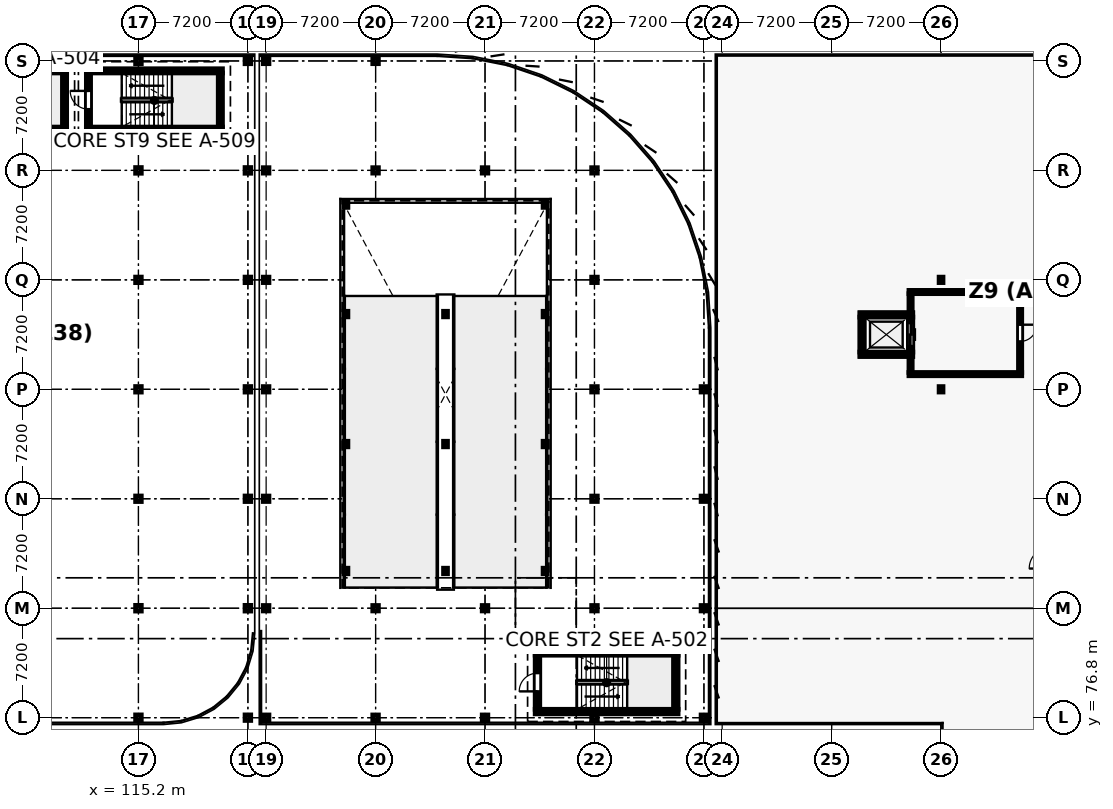
"""IFC4 building model, lengths in metres.
Left out: names, types, materials, properties, quantities, classifications, styles, units other than length and angle.
Written with IfcOpenShell. Run it as: python <this file> out.ifc"""

import sys

from ifc_helpers import new_model, si_unit, direction, frame, frame_2d, origin, origin_2d, place, context, subcontext, project, spatial, rectangle, i_section, extrude, element, fill, save


model = new_model("IFC4")
c1 = context("Model", 3, precision=1e-05, world=origin(), true_north=direction((0.0, 1.0)))
c2 = subcontext(c1, "Body", "Model", "MODEL_VIEW")
j1 = project(units=[si_unit("LENGTHUNIT", "METRE"), si_unit("PLANEANGLEUNIT", "RADIAN")], contexts=[c1])
p1 = place(None, origin())
s1 = spatial("IfcSite", under=j1, at=p1, CompositionType="ELEMENT")
p2 = place(p1, origin())
s2 = spatial("IfcBuilding", under=s1, at=p2, CompositionType="ELEMENT")
p3 = place(p2, frame((0.0, 0.0, 13.2)))
s3 = spatial("IfcBuildingStorey", under=s2, at=p3, CompositionType="ELEMENT", Elevation=13.2)
for number, where, z_axis, x_axis in (
    (1, (123.6, 76.8, 0.0), (0.0, 0.0, 1.0), (1.0, 0.0, 0.0)),
    (2, (123.6, 84.0, 0.0), (0.0, 0.0, 1.0), (1.0, 0.0, 0.0)),
    (3, (123.6, 91.2, 0.0), (0.0, 0.0, 1.0), (1.0, 0.0, 0.0)),
    (4, (123.6, 98.4, 0.0), (0.0, 0.0, 1.0), (1.0, 0.0, 0.0)),
    (5, (123.6, 105.6, 0.0), (0.0, 0.0, 1.0), (1.0, 0.0, 0.0)),
    (6, (123.6, 112.8, 0.0), (0.0, 0.0, 1.0), (1.0, 0.0, 0.0)),
    (7, (123.6, 120.0, 0.0), (0.0, 0.0, 1.0), (1.0, 0.0, 0.0)),
    (8, (130.8, 76.8, 0.0), (0.0, 0.0, 1.0), (1.0, 0.0, 0.0)),
    (9, (130.8, 84.0, 0.0), (0.0, 0.0, 1.0), (1.0, 0.0, 0.0)),
    (10, (130.8, 112.8, 0.0), (0.0, 0.0, 1.0), (1.0, 0.0, 0.0)),
    (11, (130.8, 120.0, 0.0), (0.0, 0.0, 1.0), (1.0, 0.0, 0.0)),
    (12, (138.0, 76.8, 0.0), (0.0, 0.0, 1.0), (1.0, 0.0, 0.0)),
    (13, (138.0, 84.0, 0.0), (0.0, 0.0, 1.0), (1.0, 0.0, 0.0)),
    (14, (138.0, 112.8, 0.0), (0.0, 0.0, 1.0), (1.0, 0.0, 0.0)),
    (15, (145.2, 76.8, 0.0), (0.0, 0.0, 1.0), (1.0, 0.0, 0.0)),
    (16, (145.2, 84.0, 0.0), (0.0, 0.0, 1.0), (1.0, 0.0, 0.0)),
    (17, (145.2, 91.2, 0.0), (0.0, 0.0, 1.0), (1.0, 0.0, 0.0)),
    (18, (145.2, 98.4, 0.0), (0.0, 0.0, 1.0), (1.0, 0.0, 0.0)),
    (19, (145.2, 105.6, 0.0), (0.0, 0.0, 1.0), (1.0, 0.0, 0.0)),
    (20, (145.2, 112.8, 0.0), (0.0, 0.0, 1.0), (1.0, 0.0, 0.0)),
    (21, (152.4, 76.8, 0.0), (0.0, 0.0, 1.0), (1.0, 0.0, 0.0)),
    (22, (152.4, 84.0, 0.0), (0.0, 0.0, 1.0), (1.0, 0.0, 0.0)),
    (23, (152.4, 91.2, 0.0), (0.0, 0.0, 1.0), (1.0, 0.0, 0.0)),
    (24, (152.4, 98.4, 0.0), (0.0, 0.0, 1.0), (1.0, 0.0, 0.0)),
):
    element("IfcColumn", number, at=place(p3, frame(where, z_axis=z_axis, x_axis=x_axis)), inside=s3, PredefinedType="COLUMN", context=c2, shape_type="SweptSolid", body=[
        extrude(i_section(OverallWidth=0.368, OverallDepth=0.356, WebThickness=0.011, FlangeThickness=0.018, FilletRadius=0.015, at=origin_2d()), origin(), (0.0, 0.0, 1.0), 3.9),
    ])
for number, where, z_axis, x_axis in (
    (25, (128.85, 86.45, 0.0), (0.0, 0.0, 1.0), (1.0, 0.0, 0.0)),
    (26, (135.4, 86.45, 0.0), (0.0, 0.0, 1.0), (1.0, 0.0, 0.0)),
    (27, (141.95, 86.45, 0.0), (0.0, 0.0, 1.0), (1.0, 0.0, 0.0)),
    (28, (128.85, 94.8, 0.0), (0.0, 0.0, 1.0), (1.0, 0.0, 0.0)),
    (29, (135.4, 94.8, 0.0), (0.0, 0.0, 1.0), (1.0, 0.0, 0.0)),
    (30, (141.95, 94.8, 0.0), (0.0, 0.0, 1.0), (1.0, 0.0, 0.0)),
    (31, (128.85, 103.35, 0.0), (0.0, 0.0, 1.0), (1.0, 0.0, 0.0)),
    (32, (135.4, 103.35, 0.0), (0.0, 0.0, 1.0), (1.0, 0.0, 0.0)),
    (33, (141.95, 103.35, 0.0), (0.0, 0.0, 1.0), (1.0, 0.0, 0.0)),
    (34, (128.85, 110.55, 0.0), (0.0, 0.0, 1.0), (1.0, 0.0, 0.0)),
    (35, (141.95, 110.55, 0.0), (0.0, 0.0, 1.0), (1.0, 0.0, 0.0)),
):
    element("IfcColumn", number, at=place(p3, frame(where, z_axis=z_axis, x_axis=x_axis)), inside=s3, PredefinedType="COLUMN", context=c2, shape_type="SweptSolid", body=[
        extrude(i_section(OverallWidth=0.257, OverallDepth=0.363, WebThickness=0.013, FlangeThickness=0.022, FilletRadius=0.015, at=origin_2d()), origin(), (0.0, 0.0, 1.0), 3.9),
    ])
p4 = place(p3, frame((115.2, 76.8, 0.0), z_axis=(0.0, 0.0, 1.0), x_axis=(1.0, 0.0, 0.0)))
e36 = element("IfcColumn", 36, at=p4, inside=s3, PredefinedType="COLUMN", context=c2, shape_type="SweptSolid", body=[
    extrude(i_section(OverallWidth=0.371, OverallDepth=0.363, WebThickness=0.013, FlangeThickness=0.022, FilletRadius=0.015, at=origin_2d()), origin(), (0.0, 0.0, 1.0), 3.9),
])
p5 = place(p3, frame((115.2, 84.0, 0.0), z_axis=(0.0, 0.0, 1.0), x_axis=(1.0, 0.0, 0.0)))
e37 = element("IfcColumn", 37, at=p5, inside=s3, PredefinedType="COLUMN", context=c2, shape_type="SweptSolid", body=[
    extrude(i_section(OverallWidth=0.373, OverallDepth=0.373, WebThickness=0.016, FlangeThickness=0.026, FilletRadius=0.015, at=origin_2d()), origin(), (0.0, 0.0, 1.0), 3.9),
])
for number, where, z_axis, x_axis in (
    (38, (115.2, 91.2, 0.0), (0.0, 0.0, 1.0), (1.0, 0.0, 0.0)),
    (39, (115.2, 98.4, 0.0), (0.0, 0.0, 1.0), (1.0, 0.0, 0.0)),
    (40, (115.2, 105.6, 0.0), (0.0, 0.0, 1.0), (1.0, 0.0, 0.0)),
):
    element("IfcColumn", number, at=place(p3, frame(where, z_axis=z_axis, x_axis=x_axis)), inside=s3, PredefinedType="COLUMN", context=c2, shape_type="SweptSolid", body=[
        extrude(i_section(OverallWidth=0.371, OverallDepth=0.363, WebThickness=0.013, FlangeThickness=0.022, FilletRadius=0.015, at=origin_2d()), origin(), (0.0, 0.0, 1.0), 3.9),
    ])
p6 = place(p3, frame((115.2, 112.8, 0.0), z_axis=(0.0, 0.0, 1.0), x_axis=(1.0, 0.0, 0.0)))
e41 = element("IfcColumn", 41, at=p6, inside=s3, PredefinedType="COLUMN", context=c2, shape_type="SweptSolid", body=[
    extrude(i_section(OverallWidth=0.373, OverallDepth=0.373, WebThickness=0.016, FlangeThickness=0.026, FilletRadius=0.015, at=origin_2d()), origin(), (0.0, 0.0, 1.0), 3.9),
])
for number, where, z_axis, x_axis in (
    (42, (115.2, 120.0, 0.0), (0.0, 0.0, 1.0), (1.0, 0.0, 0.0)),
    (43, (122.4, 76.8, 0.0), (0.0, 0.0, 1.0), (1.0, 0.0, 0.0)),
):
    element("IfcColumn", number, at=place(p3, frame(where, z_axis=z_axis, x_axis=x_axis)), inside=s3, PredefinedType="COLUMN", context=c2, shape_type="SweptSolid", body=[
        extrude(i_section(OverallWidth=0.371, OverallDepth=0.363, WebThickness=0.013, FlangeThickness=0.022, FilletRadius=0.015, at=origin_2d()), origin(), (0.0, 0.0, 1.0), 3.9),
    ])
p7 = place(p3, frame((122.4, 84.0, 0.0), z_axis=(0.0, 0.0, 1.0), x_axis=(1.0, 0.0, 0.0)))
e44 = element("IfcColumn", 44, at=p7, inside=s3, PredefinedType="COLUMN", context=c2, shape_type="SweptSolid", body=[
    extrude(i_section(OverallWidth=0.373, OverallDepth=0.373, WebThickness=0.016, FlangeThickness=0.026, FilletRadius=0.015, at=origin_2d()), origin(), (0.0, 0.0, 1.0), 3.9),
])
for number, where, z_axis, x_axis in (
    (45, (122.4, 91.2, 0.0), (0.0, 0.0, 1.0), (1.0, 0.0, 0.0)),
    (46, (122.4, 98.4, 0.0), (0.0, 0.0, 1.0), (1.0, 0.0, 0.0)),
    (47, (122.4, 105.6, 0.0), (0.0, 0.0, 1.0), (1.0, 0.0, 0.0)),
):
    element("IfcColumn", number, at=place(p3, frame(where, z_axis=z_axis, x_axis=x_axis)), inside=s3, PredefinedType="COLUMN", context=c2, shape_type="SweptSolid", body=[
        extrude(i_section(OverallWidth=0.371, OverallDepth=0.363, WebThickness=0.013, FlangeThickness=0.022, FilletRadius=0.015, at=origin_2d()), origin(), (0.0, 0.0, 1.0), 3.9),
    ])
p8 = place(p3, frame((122.4, 112.8, 0.0), z_axis=(0.0, 0.0, 1.0), x_axis=(1.0, 0.0, 0.0)))
e48 = element("IfcColumn", 48, at=p8, inside=s3, PredefinedType="COLUMN", context=c2, shape_type="SweptSolid", body=[
    extrude(i_section(OverallWidth=0.373, OverallDepth=0.373, WebThickness=0.016, FlangeThickness=0.026, FilletRadius=0.015, at=origin_2d()), origin(), (0.0, 0.0, 1.0), 3.9),
])
p9 = place(p3, frame((122.4, 120.0, 0.0), z_axis=(0.0, 0.0, 1.0), x_axis=(1.0, 0.0, 0.0)))
e49 = element("IfcColumn", 49, at=p9, inside=s3, PredefinedType="COLUMN", context=c2, shape_type="SweptSolid", body=[
    extrude(i_section(OverallWidth=0.371, OverallDepth=0.363, WebThickness=0.013, FlangeThickness=0.022, FilletRadius=0.015, at=origin_2d()), origin(), (0.0, 0.0, 1.0), 3.9),
])
for number, where, z_axis, x_axis in (
    (50, (168.0, 98.4, 0.0), (0.0, 0.0, 1.0), (1.0, 0.0, 0.0)),
    (51, (168.0, 105.6, 0.0), (0.0, 0.0, 1.0), (1.0, 0.0, 0.0)),
):
    element("IfcColumn", number, at=place(p3, frame(where, z_axis=z_axis, x_axis=x_axis)), inside=s3, PredefinedType="COLUMN", context=c2, shape_type="SweptSolid", body=[
        extrude(i_section(OverallWidth=0.254, OverallDepth=0.356, WebThickness=0.01, FlangeThickness=0.018, FilletRadius=0.015, at=origin_2d()), origin(), (0.0, 0.0, 1.0), 3.66),
    ])
for number, where, z_axis, x_axis in (
    (52, (150.7, 77.2, 0.0), (0.0, 0.0, 1.0), (-1.0, 0.0, 0.0)),
    (53, (141.3, 81.06, 0.0), (0.0, 0.0, 1.0), (1.0, 0.0, 0.0)),
):
    element("IfcWall", number, at=place(p3, frame(where, z_axis=z_axis, x_axis=x_axis)), inside=s3, PredefinedType="SOLIDWALL", context=c2, shape_type="SweptSolid", body=[
        extrude(rectangle(XDim=9.4, YDim=0.3, at=frame_2d((4.7, 0.0))), origin(), (0.0, 0.0, 1.0), 3.65),
    ])
p10 = place(p3, frame((141.45, 77.35, 0.0), z_axis=(0.0, 0.0, 1.0), x_axis=(0.0, 1.0, 0.0)))
e54 = element("IfcWall", 54, at=p10, inside=s3, PredefinedType="SOLIDWALL", context=c2, shape_type="SweptSolid", body=[
    extrude(rectangle(XDim=3.56, YDim=0.3, at=frame_2d((1.78, 0.0))), origin(), (0.0, 0.0, 1.0), 3.65),
])
p11 = place(p10, frame((1.18, 0.0, 0.0)))
e55 = element("IfcOpeningElement", 55, at=p11, cuts=e54, PredefinedType="OPENING", context=c2, shape_type="SweptSolid", body=[
    extrude(rectangle(XDim=1.2, YDim=2.2, at=frame_2d((0.6, 1.1))), frame((0.0, 0.16, 0.0), z_axis=(0.0, -1.0, 0.0), x_axis=(1.0, 0.0, 0.0)), (0.0, 0.0, 1.0), 0.32),
])
p12 = place(p3, frame((150.55, 80.91, 0.0), z_axis=(0.0, 0.0, 1.0), x_axis=(0.0, -1.0, 0.0)))
e56 = element("IfcWall", 56, at=p12, inside=s3, PredefinedType="SOLIDWALL", context=c2, shape_type="SweptSolid", body=[
    extrude(rectangle(XDim=3.56, YDim=0.3, at=frame_2d((1.78, 0.0))), origin(), (0.0, 0.0, 1.0), 3.65),
])
for number, where, z_axis, x_axis in (
    (57, (110.475, 115.512, 0.0), (0.0, 0.0, 1.0), (-1.0, 0.0, 0.0)),
    (58, (101.575, 119.348, 0.0), (0.0, 0.0, 1.0), (1.0, 0.0, 0.0)),
):
    element("IfcWall", number, at=place(p3, frame(where, z_axis=z_axis, x_axis=x_axis)), inside=s3, PredefinedType="SOLIDWALL", context=c2, shape_type="SweptSolid", body=[
        extrude(rectangle(XDim=8.9, YDim=0.275, at=frame_2d((4.45, 0.0))), origin(), (0.0, 0.0, 1.0), 3.66),
    ])
p13 = place(p3, frame((110.338, 119.21, 0.0), z_axis=(0.0, 0.0, 1.0), x_axis=(0.0, -1.0, 0.0)))
e59 = element("IfcWall", 59, at=p13, inside=s3, PredefinedType="SOLIDWALL", context=c2, shape_type="SweptSolid", body=[
    extrude(rectangle(XDim=3.56, YDim=0.275, at=frame_2d((1.78, 0.0))), origin(), (0.0, 0.0, 1.0), 3.66),
])
for number, where, z_axis, x_axis in (
    (60, (120.725, 115.512, 0.0), (0.0, 0.0, 1.0), (-1.0, 0.0, 0.0)),
    (61, (111.775, 119.348, 0.0), (0.0, 0.0, 1.0), (1.0, 0.0, 0.0)),
):
    element("IfcWall", number, at=place(p3, frame(where, z_axis=z_axis, x_axis=x_axis)), inside=s3, PredefinedType="SOLIDWALL", context=c2, shape_type="SweptSolid", body=[
        extrude(rectangle(XDim=8.95, YDim=0.275, at=frame_2d((4.475, 0.0))), origin(), (0.0, 0.0, 1.0), 3.66),
    ])
p14 = place(p3, frame((111.912, 115.65, 0.0), z_axis=(0.0, 0.0, 1.0), x_axis=(0.0, 1.0, 0.0)))
e62 = element("IfcWall", 62, at=p14, inside=s3, PredefinedType="SOLIDWALL", context=c2, shape_type="SweptSolid", body=[
    extrude(rectangle(XDim=3.56, YDim=0.275, at=frame_2d((1.78, 0.0))), origin(), (0.0, 0.0, 1.0), 3.66),
])
p15 = place(p14, frame((1.18, 0.0, 0.0)))
e63 = element("IfcOpeningElement", 63, at=p15, cuts=e62, PredefinedType="OPENING", context=c2, shape_type="SweptSolid", body=[
    extrude(rectangle(XDim=1.2, YDim=2.2, at=frame_2d((0.6, 1.1))), frame((0.0, 0.147, 0.0), z_axis=(0.0, -1.0, 0.0), x_axis=(1.0, 0.0, 0.0)), (0.0, 0.0, 1.0), 0.295),
])
p16 = place(p3, frame((120.588, 119.21, 0.0), z_axis=(0.0, 0.0, 1.0), x_axis=(0.0, -1.0, 0.0)))
e64 = element("IfcWall", 64, at=p16, inside=s3, PredefinedType="SOLIDWALL", context=c2, shape_type="SweptSolid", body=[
    extrude(rectangle(XDim=3.56, YDim=0.275, at=frame_2d((1.78, 0.0))), origin(), (0.0, 0.0, 1.0), 3.66),
])
for number, where, z_axis, x_axis in (
    (65, (166.14, 100.705, 0.0), (0.0, 0.0, 1.0), (-1.0, 0.0, 0.0)),
    (66, (162.66, 103.295, 0.0), (0.0, 0.0, 1.0), (1.0, 0.0, 0.0)),
):
    element("IfcWall", number, at=place(p3, frame(where, z_axis=z_axis, x_axis=x_axis)), inside=s3, PredefinedType="SHEAR", context=c2, shape_type="SweptSolid", body=[
        extrude(rectangle(XDim=3.48, YDim=0.29, at=frame_2d((1.74, 0.0))), origin(), (0.0, 0.0, 1.0), 3.4),
    ])
p17 = place(p3, frame((162.805, 100.85, 0.0), z_axis=(0.0, 0.0, 1.0), x_axis=(0.0, 1.0, 0.0)))
e67 = element("IfcWall", 67, at=p17, inside=s3, PredefinedType="SHEAR", context=c2, shape_type="SweptSolid", body=[
    extrude(rectangle(XDim=2.3, YDim=0.29, at=frame_2d((1.15, 0.0))), origin(), (0.0, 0.0, 1.0), 3.4),
])
p18 = place(p3, frame((165.995, 103.15, 0.0), z_axis=(0.0, 0.0, 1.0), x_axis=(0.0, -1.0, 0.0)))
e68 = element("IfcWall", 68, at=p18, inside=s3, PredefinedType="SHEAR", context=c2, shape_type="SweptSolid", body=[
    extrude(rectangle(XDim=2.3, YDim=0.29, at=frame_2d((1.15, 0.0))), origin(), (0.0, 0.0, 1.0), 3.4),
])
p19 = place(p18, frame((0.4, 0.0, 0.0)))
e69 = element("IfcOpeningElement", 69, at=p19, cuts=e68, PredefinedType="OPENING", context=c2, shape_type="SweptSolid", body=[
    extrude(rectangle(XDim=1.5, YDim=2.3, at=frame_2d((0.75, 1.15))), frame((0.0, 0.155, 0.0), z_axis=(0.0, -1.0, 0.0), x_axis=(1.0, 0.0, 0.0)), (0.0, 0.0, 1.0), 0.31),
])
for number, where, z_axis, x_axis in (
    (70, (173.306, 99.4, 0.0), (0.0, 0.0, 1.0), (-1.0, 0.0, 0.0)),
    (71, (165.889, 104.8, 0.0), (0.0, 0.0, 1.0), (1.0, 0.0, 0.0)),
):
    element("IfcWall", number, at=place(p3, frame(where, z_axis=z_axis, x_axis=x_axis)), inside=s3, PredefinedType="PARTITIONING", context=c2, shape_type="SweptSolid", body=[
        extrude(rectangle(XDim=7.417, YDim=0.212, at=frame_2d((3.708, 0.0))), origin(), (0.0, 0.0, 1.0), 3.13),
    ])
p20 = place(p3, frame((165.995, 99.508, 0.0), z_axis=(0.0, 0.0, 1.0), x_axis=(0.0, 1.0, 0.0)))
e72 = element("IfcWall", 72, at=p20, inside=s3, PredefinedType="PARTITIONING", context=c2, shape_type="SweptSolid", body=[
    extrude(rectangle(XDim=1.05, YDim=0.212, at=frame_2d((0.525, 0.0))), origin(), (0.0, 0.0, 1.0), 3.13),
])
p21 = place(p3, frame((165.995, 103.442, 0.0), z_axis=(0.0, 0.0, 1.0), x_axis=(0.0, 1.0, 0.0)))
e73 = element("IfcWall", 73, at=p21, inside=s3, PredefinedType="PARTITIONING", context=c2, shape_type="SweptSolid", body=[
    extrude(rectangle(XDim=1.25, YDim=0.212, at=frame_2d((0.625, 0.0))), origin(), (0.0, 0.0, 1.0), 3.13),
])
p22 = place(p3, frame((173.2, 104.692, 0.0), z_axis=(0.0, 0.0, 1.0), x_axis=(0.0, -1.0, 0.0)))
e74 = element("IfcWall", 74, at=p22, inside=s3, PredefinedType="PARTITIONING", context=c2, shape_type="SweptSolid", body=[
    extrude(rectangle(XDim=5.184, YDim=0.212, at=frame_2d((2.592, 0.0))), origin(), (0.0, 0.0, 1.0), 3.13),
])
p23 = place(p22, frame((2.042, 0.0, 0.0)))
e75 = element("IfcOpeningElement", 75, at=p23, cuts=e74, PredefinedType="OPENING", context=c2, shape_type="SweptSolid", body=[
    extrude(rectangle(XDim=1.1, YDim=2.1, at=frame_2d((0.55, 1.05))), frame((0.0, 0.116, 0.0), z_axis=(0.0, -1.0, 0.0), x_axis=(1.0, 0.0, 0.0)), (0.0, 0.0, 1.0), 0.232),
])
p24 = place(p11, origin())
e76 = element("IfcDoor", 76, at=p24, inside=s3, OperationType="SINGLE_SWING_LEFT", PredefinedType="DOOR", context=c2, shape_type="SweptSolid", body=[
    extrude(rectangle(XDim=1.2, YDim=2.2, at=frame_2d((0.6, 1.1))), frame((0.0, 0.025, 0.0), z_axis=(0.0, -1.0, 0.0), x_axis=(1.0, 0.0, 0.0)), (0.0, 0.0, 1.0), 0.05),
])
fill(e55, e76)
p25 = place(p15, origin())
e77 = element("IfcDoor", 77, at=p25, inside=s3, OperationType="SINGLE_SWING_RIGHT", PredefinedType="DOOR", context=c2, shape_type="SweptSolid", body=[
    extrude(rectangle(XDim=1.2, YDim=2.2, at=frame_2d((0.6, 1.1))), frame((0.0, 0.025, 0.0), z_axis=(0.0, -1.0, 0.0), x_axis=(1.0, 0.0, 0.0)), (0.0, 0.0, 1.0), 0.05),
])
fill(e63, e77)
p26 = place(p19, origin())
e78 = element("IfcDoor", 78, at=p26, inside=s3, OperationType="DOUBLE_DOOR_SLIDING", PredefinedType="DOOR", context=c2, shape_type="SweptSolid", body=[
    extrude(rectangle(XDim=1.5, YDim=2.3, at=frame_2d((0.75, 1.15))), frame((0.0, 0.025, 0.0), z_axis=(0.0, -1.0, 0.0), x_axis=(1.0, 0.0, 0.0)), (0.0, 0.0, 1.0), 0.05),
])
fill(e69, e78)
p27 = place(p23, origin())
e79 = element("IfcDoor", 79, at=p27, inside=s3, OperationType="SINGLE_SWING_LEFT", PredefinedType="DOOR", context=c2, shape_type="SweptSolid", body=[
    extrude(rectangle(XDim=1.1, YDim=2.1, at=frame_2d((0.55, 1.05))), frame((0.0, 0.025, 0.0), z_axis=(0.0, -1.0, 0.0), x_axis=(1.0, 0.0, 0.0)), (0.0, 0.0, 1.0), 0.05),
])
fill(e75, e79)
save(model, sys.argv[1])
